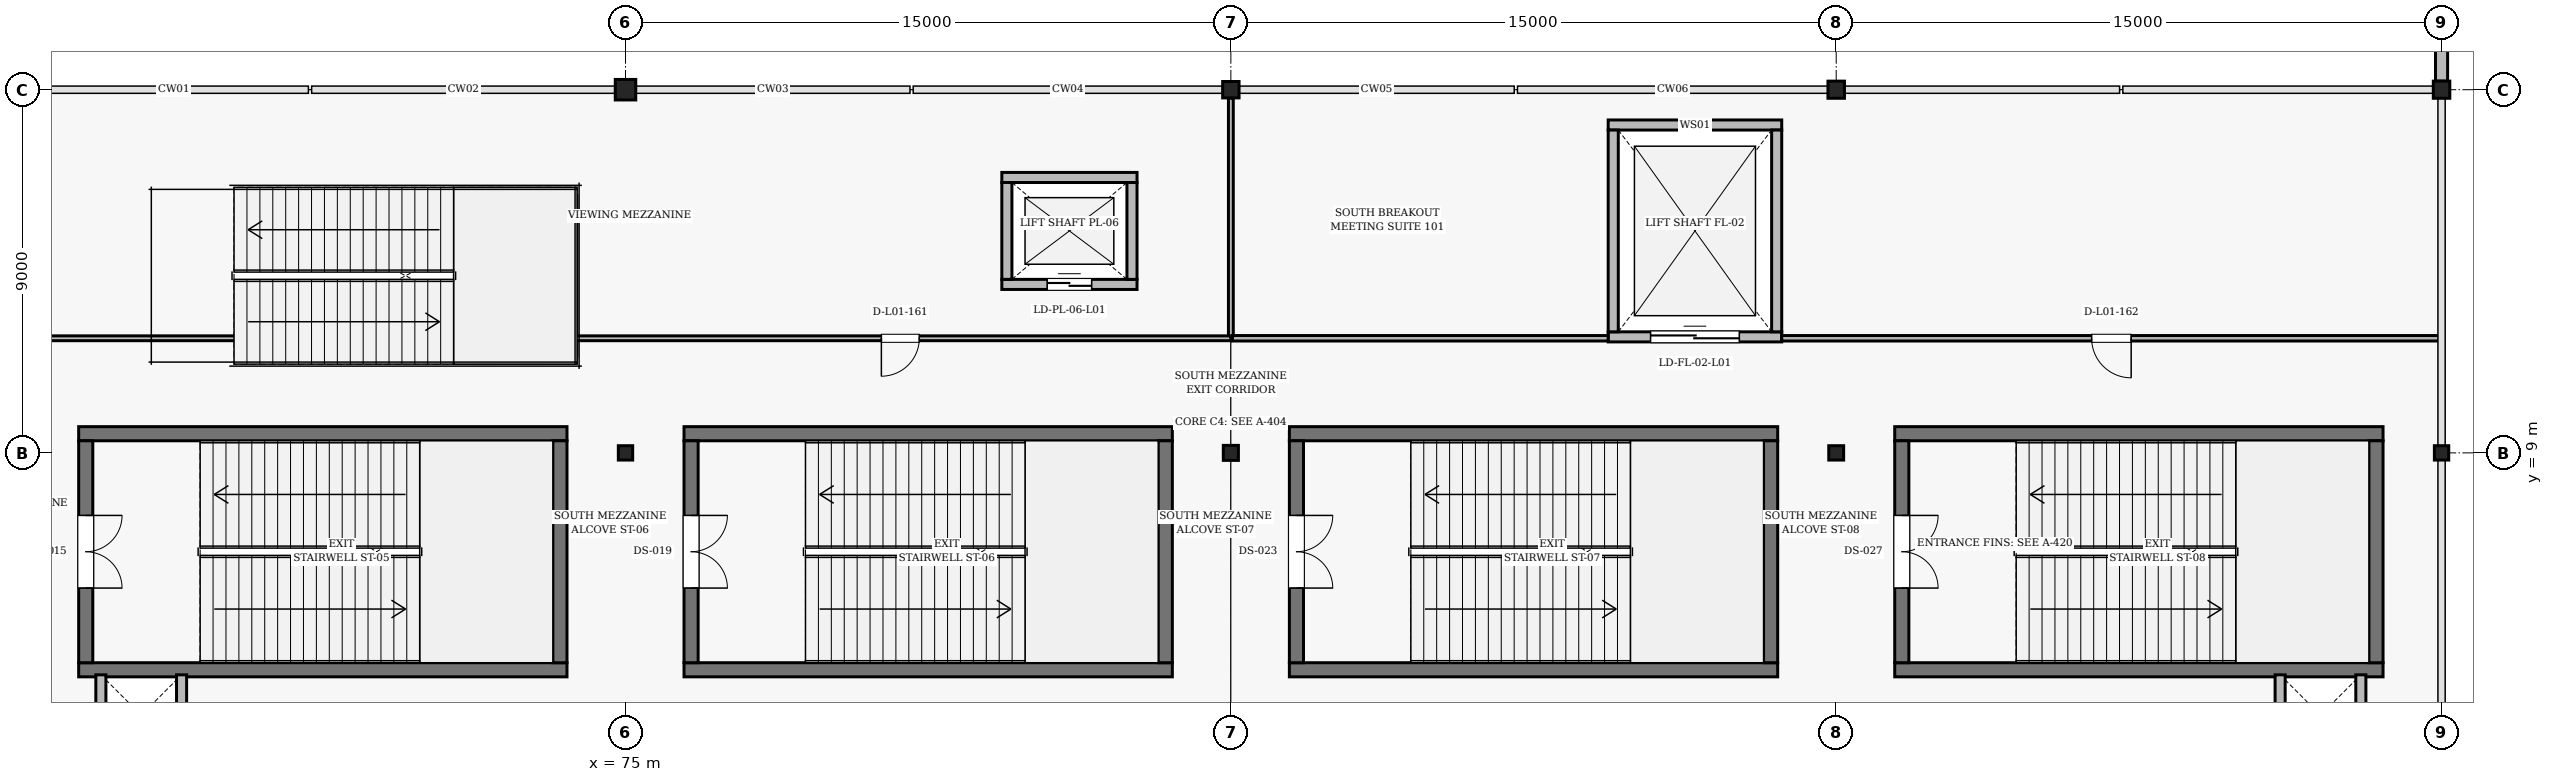
"""IFC4 building model, lengths in metres.
Left out: names, types, materials, properties, quantities, classifications, styles, units other than length and angle.
Written with IfcOpenShell. Run it as: python <this file> out.ifc"""

import sys

from ifc_helpers import new_model, si_unit, direction, frame, frame_2d, origin, origin_2d, place, context, subcontext, project, spatial, rectangle, hollow_circle, i_section, extrude, element, fill, save


model = new_model("IFC4")
c1 = context("Model", 3, precision=1e-05, world=origin(), true_north=direction((0.0, 1.0)))
c2 = subcontext(c1, "Body", "Model", "MODEL_VIEW")
j1 = project(units=[si_unit("LENGTHUNIT", "METRE"), si_unit("PLANEANGLEUNIT", "RADIAN")], contexts=[c1])
p1 = place(None, origin())
s1 = spatial("IfcSite", under=j1, at=p1, CompositionType="ELEMENT")
p2 = place(p1, origin())
s2 = spatial("IfcBuilding", under=s1, at=p2, CompositionType="ELEMENT")
p3 = place(p2, frame((0.0, 0.0, 5.4)))
s3 = spatial("IfcBuildingStorey", under=s2, at=p3, CompositionType="ELEMENT", Elevation=5.4)
p4 = place(p3, frame((75.0, 9.0, 0.0), z_axis=(0.0, 0.0, 1.0), x_axis=(1.0, 0.0, 0.0)))
e1 = element("IfcColumn", 1, at=p4, inside=s3, PredefinedType="COLUMN", context=c2, shape_type="SweptSolid", body=[
    extrude(hollow_circle(Radius=0.178, WallThickness=0.016, at=origin_2d()), origin(), (0.0, 0.0, 1.0), 5.4),
])
p5 = place(p3, frame((75.0, 18.0, 0.0), z_axis=(0.0, 0.0, 1.0), x_axis=(1.0, 0.0, 0.0)))
e2 = element("IfcColumn", 2, at=p5, inside=s3, PredefinedType="COLUMN", context=c2, shape_type="SweptSolid", body=[
    extrude(hollow_circle(Radius=0.254, WallThickness=0.02, at=origin_2d()), origin(), (0.0, 0.0, 1.0), 5.4),
])
p6 = place(p3, frame((90.0, 9.0, 0.0), z_axis=(0.0, 0.0, 1.0), x_axis=(1.0, 0.0, 0.0)))
e3 = element("IfcColumn", 3, at=p6, inside=s3, PredefinedType="COLUMN", context=c2, shape_type="SweptSolid", body=[
    extrude(i_section(OverallWidth=0.374, OverallDepth=0.372, WebThickness=0.016, FlangeThickness=0.026, FilletRadius=0.016, at=origin_2d()), origin(), (0.0, 0.0, 1.0), 5.4),
])
p7 = place(p3, frame((90.0, 18.0, 0.0), z_axis=(0.0, 0.0, 1.0), x_axis=(1.0, 0.0, 0.0)))
e4 = element("IfcColumn", 4, at=p7, inside=s3, PredefinedType="COLUMN", context=c2, shape_type="SweptSolid", body=[
    extrude(hollow_circle(Radius=0.203, WallThickness=0.016, at=origin_2d()), origin(), (0.0, 0.0, 1.0), 5.4),
])
p8 = place(p3, frame((105.0, 9.0, 0.0), z_axis=(0.0, 0.0, 1.0), x_axis=(1.0, 0.0, 0.0)))
e5 = element("IfcColumn", 5, at=p8, inside=s3, PredefinedType="COLUMN", context=c2, shape_type="SweptSolid", body=[
    extrude(i_section(OverallWidth=0.369, OverallDepth=0.356, WebThickness=0.011, FlangeThickness=0.018, FilletRadius=0.015, at=origin_2d()), origin(), (0.0, 0.0, 1.0), 5.4),
])
p9 = place(p3, frame((105.0, 18.0, 0.0), z_axis=(0.0, 0.0, 1.0), x_axis=(1.0, 0.0, 0.0)))
e6 = element("IfcColumn", 6, at=p9, inside=s3, PredefinedType="COLUMN", context=c2, shape_type="SweptSolid", body=[
    extrude(i_section(OverallWidth=0.409, OverallDepth=0.425, WebThickness=0.031, FlangeThickness=0.049, FilletRadius=0.02, at=origin_2d()), origin(), (0.0, 0.0, 1.0), 5.4),
])
p10 = place(p3, frame((120.0, 9.0, 0.0), z_axis=(0.0, 0.0, 1.0), x_axis=(1.0, 0.0, 0.0)))
e7 = element("IfcColumn", 7, at=p10, inside=s3, PredefinedType="COLUMN", context=c2, shape_type="SweptSolid", body=[
    extrude(hollow_circle(Radius=0.178, WallThickness=0.016, at=origin_2d()), origin(), (0.0, 0.0, 1.0), 5.4),
])
p11 = place(p3, frame((120.0, 18.0, 0.0), z_axis=(0.0, 0.0, 1.0), x_axis=(1.0, 0.0, 0.0)))
e8 = element("IfcColumn", 8, at=p11, inside=s3, PredefinedType="COLUMN", context=c2, shape_type="SweptSolid", body=[
    extrude(i_section(OverallWidth=0.409, OverallDepth=0.425, WebThickness=0.031, FlangeThickness=0.049, FilletRadius=0.02, at=origin_2d()), origin(), (0.0, 0.0, 1.0), 5.4),
])
p12 = place(p3, frame((120.0, 26.525, 0.0), z_axis=(0.0, 0.0, 1.0), x_axis=(0.0, -1.0, 0.0)))
e9 = element("IfcWall", 9, at=p12, inside=s3, PredefinedType="SOLIDWALL", context=c2, shape_type="SweptSolid", body=[
    extrude(rectangle(XDim=8.312, YDim=0.3, at=frame_2d((4.156, 0.0))), origin(), (0.0, 0.0, 1.0), 4.701),
])
for number, where, z_axis, x_axis in (
    (10, (61.45, 3.625, 0.0), (0.0, 0.0, 1.0), (1.0, 0.0, 0.0)),
    (11, (73.55, 9.475, 0.0), (0.0, 0.0, 1.0), (-1.0, 0.0, 0.0)),
):
    element("IfcWall", number, at=place(p3, frame(where, z_axis=z_axis, x_axis=x_axis)), inside=s3, PredefinedType="SHEAR", context=c2, shape_type="SweptSolid", body=[
        extrude(rectangle(XDim=12.1, YDim=0.35, at=frame_2d((6.05, 0.0))), origin(), (0.0, 0.0, 1.0), 5.18),
    ])
p13 = place(p3, frame((61.625, 9.3, 0.0), z_axis=(0.0, 0.0, 1.0), x_axis=(0.0, -1.0, 0.0)))
e12 = element("IfcWall", 12, at=p13, inside=s3, PredefinedType="SHEAR", context=c2, shape_type="SweptSolid", body=[
    extrude(rectangle(XDim=5.5, YDim=0.35, at=frame_2d((2.75, 0.0))), origin(), (0.0, 0.0, 1.0), 5.18),
])
p14 = place(p13, frame((1.85, 0.0, 0.0)))
e13 = element("IfcOpeningElement", 13, at=p14, cuts=e12, PredefinedType="OPENING", context=c2, shape_type="SweptSolid", body=[
    extrude(rectangle(XDim=1.8, YDim=2.2, at=frame_2d((0.9, 1.1))), frame((0.0, 0.185, 0.0), z_axis=(0.0, -1.0, 0.0), x_axis=(1.0, 0.0, 0.0)), (0.0, 0.0, 1.0), 0.37),
])
p15 = place(p3, frame((73.375, 3.8, 0.0), z_axis=(0.0, 0.0, 1.0), x_axis=(0.0, 1.0, 0.0)))
e14 = element("IfcWall", 14, at=p15, inside=s3, PredefinedType="SHEAR", context=c2, shape_type="SweptSolid", body=[
    extrude(rectangle(XDim=5.5, YDim=0.35, at=frame_2d((2.75, 0.0))), origin(), (0.0, 0.0, 1.0), 5.18),
])
for number, where, z_axis, x_axis in (
    (15, (76.45, 3.625, 0.0), (0.0, 0.0, 1.0), (1.0, 0.0, 0.0)),
    (16, (88.55, 9.475, 0.0), (0.0, 0.0, 1.0), (-1.0, 0.0, 0.0)),
):
    element("IfcWall", number, at=place(p3, frame(where, z_axis=z_axis, x_axis=x_axis)), inside=s3, PredefinedType="SHEAR", context=c2, shape_type="SweptSolid", body=[
        extrude(rectangle(XDim=12.1, YDim=0.35, at=frame_2d((6.05, 0.0))), origin(), (0.0, 0.0, 1.0), 5.18),
    ])
p16 = place(p3, frame((76.625, 9.3, 0.0), z_axis=(0.0, 0.0, 1.0), x_axis=(0.0, -1.0, 0.0)))
e17 = element("IfcWall", 17, at=p16, inside=s3, PredefinedType="SHEAR", context=c2, shape_type="SweptSolid", body=[
    extrude(rectangle(XDim=5.5, YDim=0.35, at=frame_2d((2.75, 0.0))), origin(), (0.0, 0.0, 1.0), 5.18),
])
p17 = place(p16, frame((1.85, 0.0, 0.0)))
e18 = element("IfcOpeningElement", 18, at=p17, cuts=e17, PredefinedType="OPENING", context=c2, shape_type="SweptSolid", body=[
    extrude(rectangle(XDim=1.8, YDim=2.2, at=frame_2d((0.9, 1.1))), frame((0.0, 0.185, 0.0), z_axis=(0.0, -1.0, 0.0), x_axis=(1.0, 0.0, 0.0)), (0.0, 0.0, 1.0), 0.37),
])
p18 = place(p3, frame((88.375, 3.8, 0.0), z_axis=(0.0, 0.0, 1.0), x_axis=(0.0, 1.0, 0.0)))
e19 = element("IfcWall", 19, at=p18, inside=s3, PredefinedType="SHEAR", context=c2, shape_type="SweptSolid", body=[
    extrude(rectangle(XDim=5.5, YDim=0.35, at=frame_2d((2.75, 0.0))), origin(), (0.0, 0.0, 1.0), 5.18),
])
for number, where, z_axis, x_axis in (
    (20, (91.45, 3.625, 0.0), (0.0, 0.0, 1.0), (1.0, 0.0, 0.0)),
    (21, (103.55, 9.475, 0.0), (0.0, 0.0, 1.0), (-1.0, 0.0, 0.0)),
):
    element("IfcWall", number, at=place(p3, frame(where, z_axis=z_axis, x_axis=x_axis)), inside=s3, PredefinedType="SHEAR", context=c2, shape_type="SweptSolid", body=[
        extrude(rectangle(XDim=12.1, YDim=0.35, at=frame_2d((6.05, 0.0))), origin(), (0.0, 0.0, 1.0), 5.18),
    ])
p19 = place(p3, frame((91.625, 9.3, 0.0), z_axis=(0.0, 0.0, 1.0), x_axis=(0.0, -1.0, 0.0)))
e22 = element("IfcWall", 22, at=p19, inside=s3, PredefinedType="SHEAR", context=c2, shape_type="SweptSolid", body=[
    extrude(rectangle(XDim=5.5, YDim=0.35, at=frame_2d((2.75, 0.0))), origin(), (0.0, 0.0, 1.0), 5.18),
])
p20 = place(p19, frame((1.85, 0.0, 0.0)))
e23 = element("IfcOpeningElement", 23, at=p20, cuts=e22, PredefinedType="OPENING", context=c2, shape_type="SweptSolid", body=[
    extrude(rectangle(XDim=1.8, YDim=2.2, at=frame_2d((0.9, 1.1))), frame((0.0, 0.185, 0.0), z_axis=(0.0, -1.0, 0.0), x_axis=(1.0, 0.0, 0.0)), (0.0, 0.0, 1.0), 0.37),
])
p21 = place(p3, frame((103.375, 3.8, 0.0), z_axis=(0.0, 0.0, 1.0), x_axis=(0.0, 1.0, 0.0)))
e24 = element("IfcWall", 24, at=p21, inside=s3, PredefinedType="SHEAR", context=c2, shape_type="SweptSolid", body=[
    extrude(rectangle(XDim=5.5, YDim=0.35, at=frame_2d((2.75, 0.0))), origin(), (0.0, 0.0, 1.0), 5.18),
])
for number, where, z_axis, x_axis in (
    (25, (106.45, 3.625, 0.0), (0.0, 0.0, 1.0), (1.0, 0.0, 0.0)),
    (26, (118.55, 9.475, 0.0), (0.0, 0.0, 1.0), (-1.0, 0.0, 0.0)),
):
    element("IfcWall", number, at=place(p3, frame(where, z_axis=z_axis, x_axis=x_axis)), inside=s3, PredefinedType="SHEAR", context=c2, shape_type="SweptSolid", body=[
        extrude(rectangle(XDim=12.1, YDim=0.35, at=frame_2d((6.05, 0.0))), origin(), (0.0, 0.0, 1.0), 5.18),
    ])
p22 = place(p3, frame((106.625, 9.3, 0.0), z_axis=(0.0, 0.0, 1.0), x_axis=(0.0, -1.0, 0.0)))
e27 = element("IfcWall", 27, at=p22, inside=s3, PredefinedType="SHEAR", context=c2, shape_type="SweptSolid", body=[
    extrude(rectangle(XDim=5.5, YDim=0.35, at=frame_2d((2.75, 0.0))), origin(), (0.0, 0.0, 1.0), 5.18),
])
p23 = place(p22, frame((1.85, 0.0, 0.0)))
e28 = element("IfcOpeningElement", 28, at=p23, cuts=e27, PredefinedType="OPENING", context=c2, shape_type="SweptSolid", body=[
    extrude(rectangle(XDim=1.8, YDim=2.2, at=frame_2d((0.9, 1.1))), frame((0.0, 0.185, 0.0), z_axis=(0.0, -1.0, 0.0), x_axis=(1.0, 0.0, 0.0)), (0.0, 0.0, 1.0), 0.37),
])
p24 = place(p3, frame((118.375, 3.8, 0.0), z_axis=(0.0, 0.0, 1.0), x_axis=(0.0, 1.0, 0.0)))
e29 = element("IfcWall", 29, at=p24, inside=s3, PredefinedType="SHEAR", context=c2, shape_type="SweptSolid", body=[
    extrude(rectangle(XDim=5.5, YDim=0.35, at=frame_2d((2.75, 0.0))), origin(), (0.0, 0.0, 1.0), 5.18),
])
for number, where, z_axis, x_axis in (
    (30, (70.82, 11.4, 0.0), (0.0, 0.0, 1.0), (1.0, 0.0, 0.0)),
    (31, (70.82, 15.38, 0.0), (0.0, 0.0, 1.0), (1.0, 0.0, 0.0)),
):
    element("IfcWall", number, at=place(p3, frame(where, z_axis=z_axis, x_axis=x_axis)), inside=s3, PredefinedType="SHEAR", context=c2, shape_type="SweptSolid", body=[
        extrude(rectangle(XDim=2.8, YDim=0.35, at=frame_2d((1.4, 0.0))), origin(), (0.0, 0.0, 1.0), 2.5),
    ])
p25 = place(p3, frame((73.62, 11.4, 0.0), z_axis=(0.0, 0.0, 1.0), x_axis=(0.0, 1.0, 0.0)))
e32 = element("IfcWall", 32, at=p25, inside=s3, PredefinedType="SHEAR", context=c2, shape_type="SweptSolid", body=[
    extrude(rectangle(XDim=3.98, YDim=0.35, at=frame_2d((1.99, 0.0))), origin(), (0.0, 0.0, 1.0), 2.5),
])
p26 = place(p3, frame((84.325, 13.175, 0.0), z_axis=(0.0, 0.0, 1.0), x_axis=(1.0, 0.0, 0.0)))
e33 = element("IfcWall", 33, at=p26, inside=s3, PredefinedType="SOLIDWALL", context=c2, shape_type="SweptSolid", body=[
    extrude(rectangle(XDim=3.35, YDim=0.25, at=frame_2d((1.675, 0.0))), origin(), (0.0, 0.0, 1.0), 5.16),
])
p27 = place(p26, frame((1.125, 0.0, 0.0)))
e34 = element("IfcOpeningElement", 34, at=p27, cuts=e33, PredefinedType="OPENING", context=c2, shape_type="SweptSolid", body=[
    extrude(rectangle(XDim=1.1, YDim=2.2, at=frame_2d((0.55, 1.1))), frame((0.0, 0.135, 0.0), z_axis=(0.0, -1.0, 0.0), x_axis=(1.0, 0.0, 0.0)), (0.0, 0.0, 1.0), 0.27),
])
p28 = place(p3, frame((87.675, 15.825, 0.0), z_axis=(0.0, 0.0, 1.0), x_axis=(-1.0, 0.0, 0.0)))
e35 = element("IfcWall", 35, at=p28, inside=s3, PredefinedType="SOLIDWALL", context=c2, shape_type="SweptSolid", body=[
    extrude(rectangle(XDim=3.35, YDim=0.25, at=frame_2d((1.675, 0.0))), origin(), (0.0, 0.0, 1.0), 5.16),
])
for number, where, z_axis, x_axis in (
    (36, (84.45, 15.7, 0.0), (0.0, 0.0, 1.0), (0.0, -1.0, 0.0)),
    (37, (87.55, 13.3, 0.0), (0.0, 0.0, 1.0), (0.0, 1.0, 0.0)),
):
    element("IfcWall", number, at=place(p3, frame(where, z_axis=z_axis, x_axis=x_axis)), inside=s3, PredefinedType="SOLIDWALL", context=c2, shape_type="SweptSolid", body=[
        extrude(rectangle(XDim=2.4, YDim=0.25, at=frame_2d((1.2, 0.0))), origin(), (0.0, 0.0, 1.0), 5.16),
    ])
p29 = place(p3, frame((99.35, 11.875, 0.0), z_axis=(0.0, 0.0, 1.0), x_axis=(1.0, 0.0, 0.0)))
e38 = element("IfcWall", 38, at=p29, inside=s3, PredefinedType="SOLIDWALL", context=c2, shape_type="SweptSolid", body=[
    extrude(rectangle(XDim=4.3, YDim=0.25, at=frame_2d((2.15, 0.0))), origin(), (0.0, 0.0, 1.0), 5.16),
])
p30 = place(p29, frame((1.05, 0.0, 0.0)))
e39 = element("IfcOpeningElement", 39, at=p30, cuts=e38, PredefinedType="OPENING", context=c2, shape_type="SweptSolid", body=[
    extrude(rectangle(XDim=2.2, YDim=2.5, at=frame_2d((1.1, 1.25))), frame((0.0, 0.135, 0.0), z_axis=(0.0, -1.0, 0.0), x_axis=(1.0, 0.0, 0.0)), (0.0, 0.0, 1.0), 0.27),
])
p31 = place(p3, frame((103.65, 17.125, 0.0), z_axis=(0.0, 0.0, 1.0), x_axis=(-1.0, 0.0, 0.0)))
e40 = element("IfcWall", 40, at=p31, inside=s3, PredefinedType="SOLIDWALL", context=c2, shape_type="SweptSolid", body=[
    extrude(rectangle(XDim=4.3, YDim=0.25, at=frame_2d((2.15, 0.0))), origin(), (0.0, 0.0, 1.0), 5.16),
])
for number, where, z_axis, x_axis in (
    (41, (99.475, 17.0, 0.0), (0.0, 0.0, 1.0), (0.0, -1.0, 0.0)),
    (42, (103.525, 12.0, 0.0), (0.0, 0.0, 1.0), (0.0, 1.0, 0.0)),
):
    element("IfcWall", number, at=place(p3, frame(where, z_axis=z_axis, x_axis=x_axis)), inside=s3, PredefinedType="SOLIDWALL", context=c2, shape_type="SweptSolid", body=[
        extrude(rectangle(XDim=5.0, YDim=0.25, at=frame_2d((2.5, 0.0))), origin(), (0.0, 0.0, 1.0), 5.16),
    ])
p32 = place(p3, frame((90.0, 17.79, 0.0), z_axis=(0.0, 0.0, 1.0), x_axis=(0.0, -1.0, 0.0)))
e43 = element("IfcWall", 43, at=p32, inside=s3, PredefinedType="PARTITIONING", context=c2, shape_type="SweptSolid", body=[
    extrude(rectangle(XDim=5.95, YDim=0.12, at=frame_2d((2.975, 0.0))), origin(), (0.0, 0.0, 1.0), 4.554),
])
p33 = place(p3, frame((90.0, 11.84, 0.0), z_axis=(0.0, 0.0, 1.0), x_axis=(-1.0, 0.0, 0.0)))
e44 = element("IfcWall", 44, at=p33, inside=s3, PredefinedType="PARTITIONING", context=c2, shape_type="SweptSolid", body=[
    extrude(rectangle(XDim=16.38, YDim=0.12, at=frame_2d((8.19, 0.0))), origin(), (0.0, 0.0, 1.0), 4.481),
])
p34 = place(p33, frame((7.72, 0.0, 0.0)))
e45 = element("IfcOpeningElement", 45, at=p34, cuts=e44, PredefinedType="OPENING", context=c2, shape_type="SweptSolid", body=[
    extrude(rectangle(XDim=0.94, YDim=2.15, at=frame_2d((0.47, 1.075))), frame((0.0, 0.07, 0.0), z_axis=(0.0, -1.0, 0.0), x_axis=(1.0, 0.0, 0.0)), (0.0, 0.0, 1.0), 0.14),
])
p35 = place(p3, frame((70.82, 11.84, 0.0), z_axis=(0.0, 0.0, 1.0), x_axis=(-1.0, 0.0, 0.0)))
e46 = element("IfcWall", 46, at=p35, inside=s3, PredefinedType="PARTITIONING", context=c2, shape_type="SweptSolid", body=[
    extrude(rectangle(XDim=10.68, YDim=0.12, at=frame_2d((5.34, 0.0))), origin(), (0.0, 0.0, 1.0), 4.47),
])
p36 = place(p3, frame((119.988, 11.84, 0.0), z_axis=(0.0, 0.0, 1.0), x_axis=(-1.0, 0.0, 0.0)))
e47 = element("IfcWall", 47, at=p36, inside=s3, PredefinedType="PARTITIONING", context=c2, shape_type="SweptSolid", body=[
    extrude(rectangle(XDim=16.338, YDim=0.135, at=frame_2d((8.169, 0.0))), origin(), (0.0, 0.0, 1.0), 4.392),
])
p37 = place(p36, frame((7.679, 0.0, 0.0)))
e48 = element("IfcOpeningElement", 48, at=p37, cuts=e47, PredefinedType="OPENING", context=c2, shape_type="SweptSolid", body=[
    extrude(rectangle(XDim=0.98, YDim=2.15, at=frame_2d((0.49, 1.075))), frame((0.0, 0.078, 0.0), z_axis=(0.0, -1.0, 0.0), x_axis=(1.0, 0.0, 0.0)), (0.0, 0.0, 1.0), 0.155),
])
p38 = place(p3, frame((99.35, 11.84, 0.0), z_axis=(0.0, 0.0, 1.0), x_axis=(-1.0, 0.0, 0.0)))
e49 = element("IfcWall", 49, at=p38, inside=s3, PredefinedType="PARTITIONING", context=c2, shape_type="SweptSolid", body=[
    extrude(rectangle(XDim=9.31, YDim=0.135, at=frame_2d((4.655, 0.0))), origin(), (0.0, 0.0, 1.0), 4.554),
])
for number, where, z_axis, x_axis in (
    (50, (62.0, 3.5, 0.0), (0.0, 0.0, 1.0), (0.0, -1.0, 0.0)),
    (51, (64.0, 1.5, 0.0), (0.0, 0.0, 1.0), (0.0, 1.0, 0.0)),
    (52, (116.0, 3.5, 0.0), (0.0, 0.0, 1.0), (0.0, -1.0, 0.0)),
    (53, (118.0, 1.5, 0.0), (0.0, 0.0, 1.0), (0.0, 1.0, 0.0)),
):
    element("IfcWall", number, at=place(p3, frame(where, z_axis=z_axis, x_axis=x_axis)), inside=s3, PredefinedType="SOLIDWALL", context=c2, shape_type="SweptSolid", body=[
        extrude(rectangle(XDim=2.0, YDim=0.25, at=frame_2d((1.0, 0.0))), origin(), (0.0, 0.0, 1.0), 4.81),
    ])
p39 = place(p14, origin())
e54 = element("IfcDoor", 54, at=p39, inside=s3, OperationType="DOUBLE_DOOR_SINGLE_SWING", PredefinedType="DOOR", context=c2, shape_type="SweptSolid", body=[
    extrude(rectangle(XDim=1.8, YDim=2.2, at=frame_2d((0.9, 1.1))), frame((0.0, 0.025, 0.0), z_axis=(0.0, -1.0, 0.0), x_axis=(1.0, 0.0, 0.0)), (0.0, 0.0, 1.0), 0.05),
])
fill(e13, e54)
p40 = place(p17, origin())
e55 = element("IfcDoor", 55, at=p40, inside=s3, OperationType="DOUBLE_DOOR_SINGLE_SWING", PredefinedType="DOOR", context=c2, shape_type="SweptSolid", body=[
    extrude(rectangle(XDim=1.8, YDim=2.2, at=frame_2d((0.9, 1.1))), frame((0.0, 0.025, 0.0), z_axis=(0.0, -1.0, 0.0), x_axis=(1.0, 0.0, 0.0)), (0.0, 0.0, 1.0), 0.05),
])
fill(e18, e55)
p41 = place(p20, origin())
e56 = element("IfcDoor", 56, at=p41, inside=s3, OperationType="DOUBLE_DOOR_SINGLE_SWING", PredefinedType="DOOR", context=c2, shape_type="SweptSolid", body=[
    extrude(rectangle(XDim=1.8, YDim=2.2, at=frame_2d((0.9, 1.1))), frame((0.0, 0.025, 0.0), z_axis=(0.0, -1.0, 0.0), x_axis=(1.0, 0.0, 0.0)), (0.0, 0.0, 1.0), 0.05),
])
fill(e23, e56)
p42 = place(p23, origin())
e57 = element("IfcDoor", 57, at=p42, inside=s3, OperationType="DOUBLE_DOOR_SINGLE_SWING", PredefinedType="DOOR", context=c2, shape_type="SweptSolid", body=[
    extrude(rectangle(XDim=1.8, YDim=2.2, at=frame_2d((0.9, 1.1))), frame((0.0, 0.025, 0.0), z_axis=(0.0, -1.0, 0.0), x_axis=(1.0, 0.0, 0.0)), (0.0, 0.0, 1.0), 0.05),
])
fill(e28, e57)
p43 = place(p27, origin())
e58 = element("IfcDoor", 58, at=p43, inside=s3, OperationType="DOUBLE_DOOR_SLIDING", PredefinedType="DOOR", context=c2, shape_type="SweptSolid", body=[
    extrude(rectangle(XDim=1.1, YDim=2.2, at=frame_2d((0.55, 1.1))), frame((0.0, 0.025, 0.0), z_axis=(0.0, -1.0, 0.0), x_axis=(1.0, 0.0, 0.0)), (0.0, 0.0, 1.0), 0.05),
])
fill(e34, e58)
p44 = place(p30, origin())
e59 = element("IfcDoor", 59, at=p44, inside=s3, OperationType="DOUBLE_DOOR_SLIDING", PredefinedType="DOOR", context=c2, shape_type="SweptSolid", body=[
    extrude(rectangle(XDim=2.2, YDim=2.5, at=frame_2d((1.1, 1.25))), frame((0.0, 0.025, 0.0), z_axis=(0.0, -1.0, 0.0), x_axis=(1.0, 0.0, 0.0)), (0.0, 0.0, 1.0), 0.05),
])
fill(e39, e59)
p45 = place(p34, origin())
e60 = element("IfcDoor", 60, at=p45, inside=s3, OperationType="SINGLE_SWING_RIGHT", PredefinedType="DOOR", context=c2, shape_type="SweptSolid", body=[
    extrude(rectangle(XDim=0.94, YDim=2.15, at=frame_2d((0.47, 1.075))), frame((0.0, 0.025, 0.0), z_axis=(0.0, -1.0, 0.0), x_axis=(1.0, 0.0, 0.0)), (0.0, 0.0, 1.0), 0.05),
])
fill(e45, e60)
p46 = place(p37, origin())
e61 = element("IfcDoor", 61, at=p46, inside=s3, OperationType="SINGLE_SWING_LEFT", PredefinedType="DOOR", context=c2, shape_type="SweptSolid", body=[
    extrude(rectangle(XDim=0.98, YDim=2.15, at=frame_2d((0.49, 1.075))), frame((0.0, 0.025, 0.0), z_axis=(0.0, -1.0, 0.0), x_axis=(1.0, 0.0, 0.0)), (0.0, 0.0, 1.0), 0.05),
])
fill(e48, e61)
save(model, sys.argv[1])
